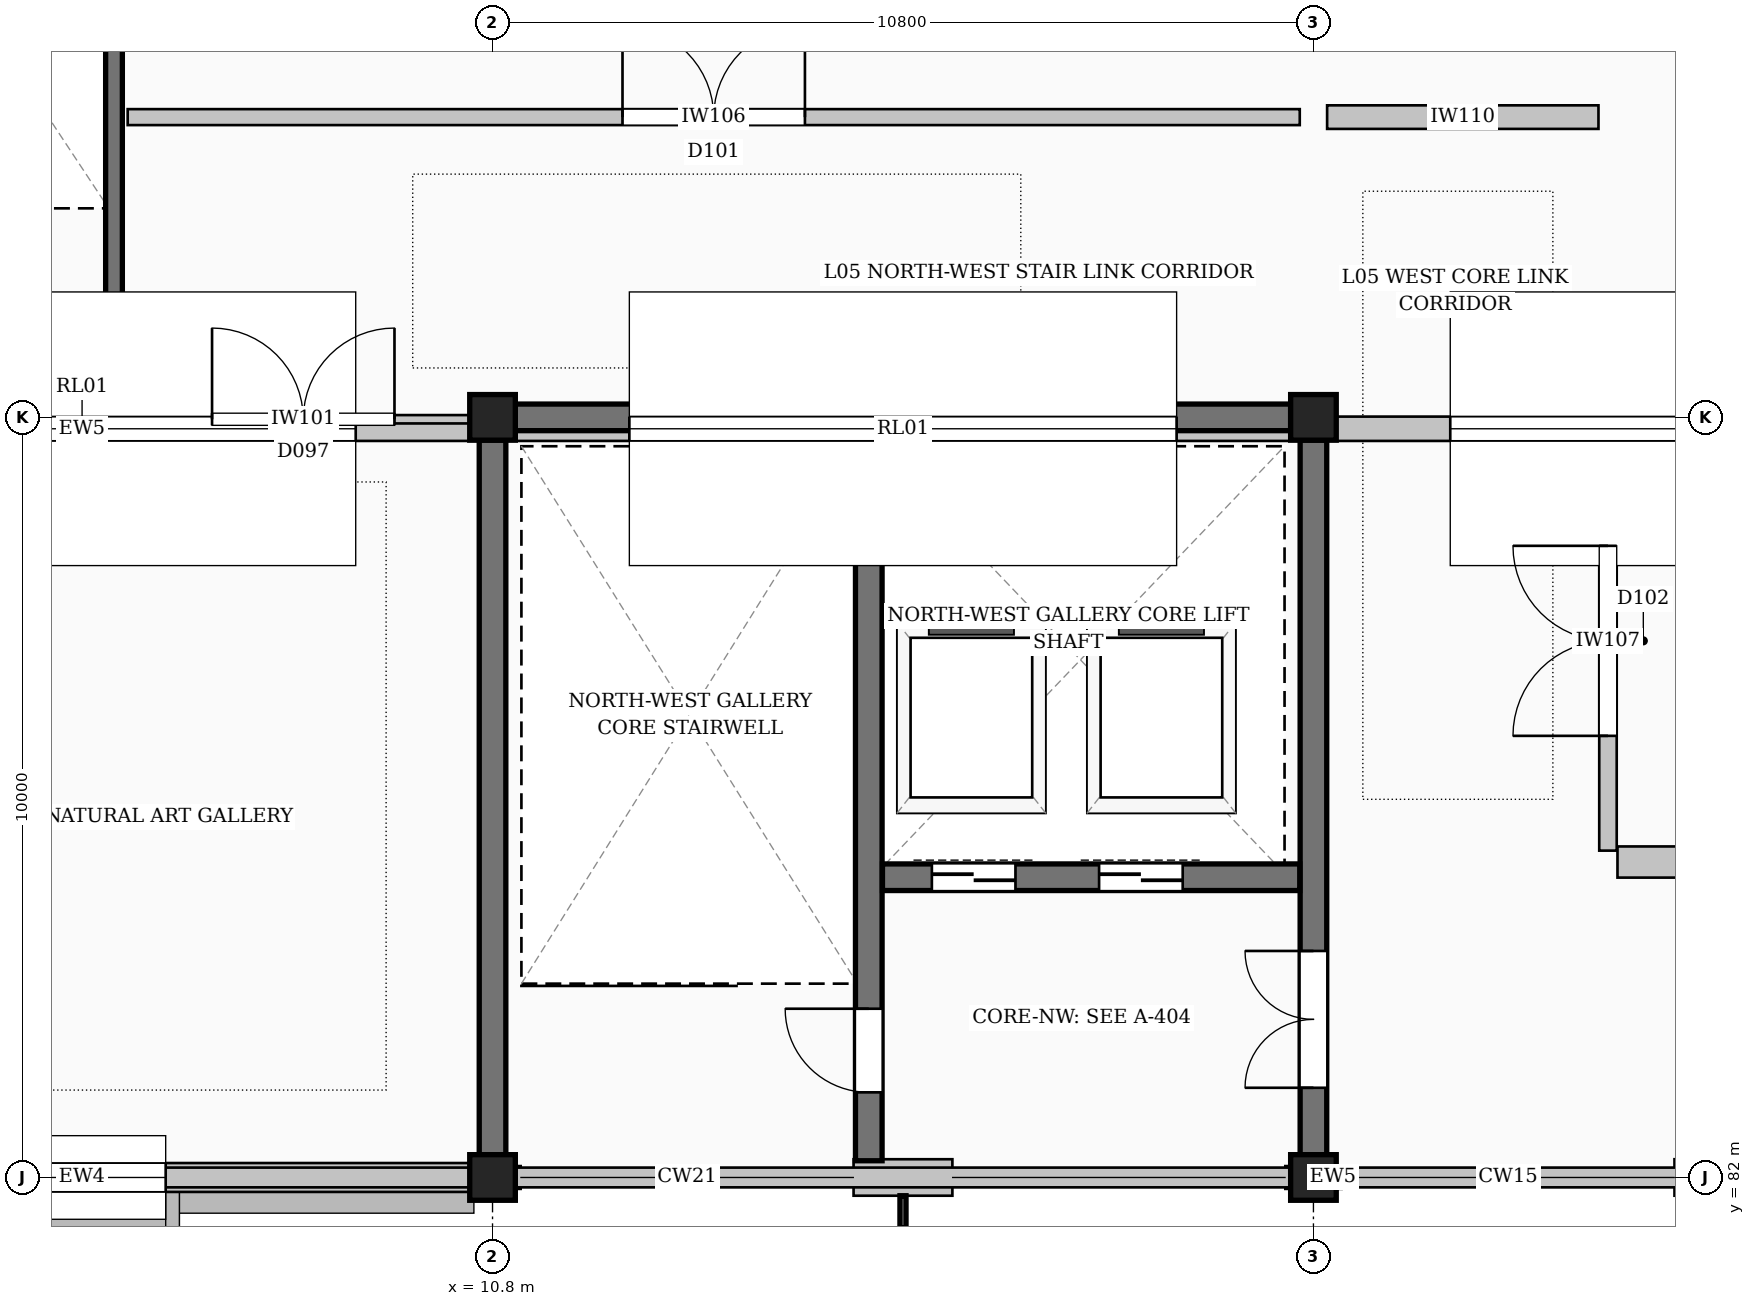
"""IFC4 building model, lengths in metres.
Left out: names, types, materials, properties, quantities, classifications, styles, units other than length and angle.
Written with IfcOpenShell. Run it as: python <this file> out.ifc"""

import sys

from ifc_helpers import new_model, si_unit, direction, frame, frame_2d, origin, origin_2d, place, context, subcontext, project, spatial, rectangle, extrude, element, fill, save


model = new_model("IFC4")
c1 = context("Model", 3, precision=1e-05, world=origin(), true_north=direction((0.0, 1.0)))
c2 = subcontext(c1, "Body", "Model", "MODEL_VIEW")
j1 = project(units=[si_unit("LENGTHUNIT", "METRE"), si_unit("PLANEANGLEUNIT", "RADIAN")], contexts=[c1])
p1 = place(None, origin())
s1 = spatial("IfcSite", under=j1, at=p1, CompositionType="ELEMENT")
p2 = place(p1, origin())
s2 = spatial("IfcBuilding", under=s1, at=p2, CompositionType="ELEMENT")
p3 = place(p2, frame((0.0, 0.0, 28.8)))
s3 = spatial("IfcBuildingStorey", under=s2, at=p3, CompositionType="ELEMENT", Elevation=28.8)
for number, where, z_axis, x_axis in (
    (1, (10.8, 82.0, 0.0), (0.0, 0.0, 1.0), (1.0, 0.0, 0.0)),
    (2, (10.8, 92.0, 0.0), (0.0, 0.0, 1.0), (1.0, 0.0, 0.0)),
    (3, (21.6, 82.0, 0.0), (0.0, 0.0, 1.0), (1.0, 0.0, 0.0)),
    (4, (21.6, 92.0, 0.0), (0.0, 0.0, 1.0), (1.0, 0.0, 0.0)),
):
    element("IfcColumn", number, at=place(p3, frame(where, z_axis=z_axis, x_axis=x_axis)), inside=s3, PredefinedType="COLUMN", context=c2, shape_type="SweptSolid", body=[
        extrude(rectangle(XDim=0.6, YDim=0.6, at=origin_2d()), origin(), (0.0, 0.0, 1.0), 5.4),
    ])
p4 = place(p3, frame((0.145, 82.0, 0.0), z_axis=(0.0, 0.0, 1.0), x_axis=(1.0, 0.0, 0.0)))
e5 = element("IfcWall", 5, at=p4, inside=s3, PredefinedType="STANDARD", context=c2, shape_type="SweptSolid", body=[
    extrude(rectangle(XDim=10.51, YDim=0.38, at=frame_2d((5.255, 0.0))), origin(), (0.0, 0.0, 1.0), 5.044),
])
p5 = place(p4, frame((4.155, 0.0, 1.0)))
e6 = element("IfcOpeningElement", 6, at=p5, cuts=e5, PredefinedType="OPENING", context=c2, shape_type="SweptSolid", body=[
    extrude(rectangle(XDim=2.2, YDim=3.0, at=frame_2d((1.1, 1.5))), frame((0.0, 0.2, 0.0), z_axis=(0.0, -1.0, 0.0), x_axis=(1.0, 0.0, 0.0)), (0.0, 0.0, 1.0), 0.4),
])
p6 = place(p3, frame((15.55, 82.0, 0.0), z_axis=(0.0, 0.0, 1.0), x_axis=(1.0, 0.0, 0.0)))
e7 = element("IfcWall", 7, at=p6, inside=s3, PredefinedType="STANDARD", context=c2, shape_type="SweptSolid", body=[
    extrude(rectangle(XDim=1.3, YDim=0.48, at=frame_2d((0.65, 0.0))), origin(), (0.0, 0.0, 1.0), 5.044),
])
p7 = place(p3, frame((10.945, 82.0, 0.0), z_axis=(0.0, 0.0, 1.0), x_axis=(1.0, 0.0, 0.0)))
e8 = element("IfcWall", 8, at=p7, inside=s3, PredefinedType="STANDARD", context=c2, shape_type="SweptSolid", body=[
    extrude(rectangle(XDim=0.225, YDim=0.3, at=frame_2d((0.112, 0.0))), origin(), (0.0, 0.0, 1.0), 5.16),
])
p8 = place(p3, frame((21.23, 82.0, 0.0), z_axis=(0.0, 0.0, 1.0), x_axis=(1.0, 0.0, 0.0)))
e9 = element("IfcWall", 9, at=p8, inside=s3, PredefinedType="STANDARD", context=c2, shape_type="SweptSolid", body=[
    extrude(rectangle(XDim=0.225, YDim=0.3, at=frame_2d((0.113, 0.0))), origin(), (0.0, 0.0, 1.0), 5.16),
])
p9 = place(p3, frame((21.745, 82.0, 0.0), z_axis=(0.0, 0.0, 1.0), x_axis=(1.0, 0.0, 0.0)))
e10 = element("IfcWall", 10, at=p9, inside=s3, PredefinedType="STANDARD", context=c2, shape_type="SweptSolid", body=[
    extrude(rectangle(XDim=0.225, YDim=0.3, at=frame_2d((0.112, 0.0))), origin(), (0.0, 0.0, 1.0), 5.16),
])
p10 = place(p3, frame((0.16, 91.85, 5.4), z_axis=(0.0, 0.0, 1.0), x_axis=(1.0, 0.0, 0.0)))
e11 = element("IfcWall", 11, at=p10, inside=s3, PredefinedType="STANDARD", context=c2, shape_type="SweptSolid", body=[
    extrude(rectangle(XDim=10.48, YDim=0.32, at=frame_2d((5.24, 0.0))), origin(), (0.0, 0.0, 1.0), 2.45),
])
p11 = place(p10, frame((1.64, 0.0, 0.45)))
e12 = element("IfcOpeningElement", 12, at=p11, cuts=e11, PredefinedType="OPENING", context=c2, shape_type="SweptSolid", body=[
    extrude(rectangle(XDim=7.2, YDim=1.5, at=frame_2d((3.6, 0.75))), frame((0.0, 0.17, 0.0), z_axis=(0.0, -1.0, 0.0), x_axis=(1.0, 0.0, 0.0)), (0.0, 0.0, 1.0), 0.34),
])
p12 = place(p3, frame((10.96, 91.85, 5.4), z_axis=(0.0, 0.0, 1.0), x_axis=(1.0, 0.0, 0.0)))
e13 = element("IfcWall", 13, at=p12, inside=s3, PredefinedType="STANDARD", context=c2, shape_type="SweptSolid", body=[
    extrude(rectangle(XDim=10.48, YDim=0.32, at=frame_2d((5.24, 0.0))), origin(), (0.0, 0.0, 1.0), 2.45),
])
p13 = place(p12, frame((1.64, 0.0, 0.45)))
e14 = element("IfcOpeningElement", 14, at=p13, cuts=e13, PredefinedType="OPENING", context=c2, shape_type="SweptSolid", body=[
    extrude(rectangle(XDim=7.2, YDim=1.5, at=frame_2d((3.6, 0.75))), frame((0.0, 0.17, 0.0), z_axis=(0.0, -1.0, 0.0), x_axis=(1.0, 0.0, 0.0)), (0.0, 0.0, 1.0), 0.34),
])
p14 = place(p3, frame((21.76, 91.85, 5.4), z_axis=(0.0, 0.0, 1.0), x_axis=(1.0, 0.0, 0.0)))
e15 = element("IfcWall", 15, at=p14, inside=s3, PredefinedType="STANDARD", context=c2, shape_type="SweptSolid", body=[
    extrude(rectangle(XDim=10.48, YDim=0.32, at=frame_2d((5.24, 0.0))), origin(), (0.0, 0.0, 1.0), 2.45),
])
p15 = place(p14, frame((1.64, 0.0, 0.45)))
e16 = element("IfcOpeningElement", 16, at=p15, cuts=e15, PredefinedType="OPENING", context=c2, shape_type="SweptSolid", body=[
    extrude(rectangle(XDim=7.2, YDim=1.5, at=frame_2d((3.6, 0.75))), frame((0.0, 0.17, 0.0), z_axis=(0.0, -1.0, 0.0), x_axis=(1.0, 0.0, 0.0)), (0.0, 0.0, 1.0), 0.34),
])
p16 = place(p3, frame((0.35, 82.0, 5.22), z_axis=(0.0, 0.0, 1.0), x_axis=(1.0, 0.0, 0.0)))
e17 = element("IfcWall", 17, at=p16, inside=s3, PredefinedType="PARAPET", context=c2, shape_type="SweptSolid", body=[
    extrude(rectangle(XDim=74.9, YDim=0.26, at=frame_2d((37.45, 0.0))), origin(), (0.0, 0.0, 1.0), 0.55),
])
p17 = place(p3, frame((11.1, 92.0, 0.0), z_axis=(0.0, 0.0, 1.0), x_axis=(1.0, 0.0, 0.0)))
e18 = element("IfcWall", 18, at=p17, inside=s3, PredefinedType="SHEAR", context=c2, shape_type="SweptSolid", body=[
    extrude(rectangle(XDim=10.2, YDim=0.35, at=frame_2d((5.1, 0.0))), origin(), (0.0, 0.0, 1.0), 5.16),
])
p18 = place(p3, frame((10.8, 82.3, 0.0), z_axis=(0.0, 0.0, 1.0), x_axis=(0.0, 1.0, 0.0)))
e19 = element("IfcWall", 19, at=p18, inside=s3, PredefinedType="SHEAR", context=c2, shape_type="SweptSolid", body=[
    extrude(rectangle(XDim=9.4, YDim=0.35, at=frame_2d((4.7, 0.0))), origin(), (0.0, 0.0, 1.0), 5.16),
])
p19 = place(p3, frame((21.6, 82.3, 0.0), z_axis=(0.0, 0.0, 1.0), x_axis=(0.0, 1.0, 0.0)))
e20 = element("IfcWall", 20, at=p19, inside=s3, PredefinedType="SHEAR", context=c2, shape_type="SweptSolid", body=[
    extrude(rectangle(XDim=9.4, YDim=0.35, at=frame_2d((4.7, 0.0))), origin(), (0.0, 0.0, 1.0), 5.16),
])
p20 = place(p19, frame((0.88, 0.0, 0.0)))
e21 = element("IfcOpeningElement", 21, at=p20, cuts=e20, PredefinedType="OPENING", context=c2, shape_type="SweptSolid", body=[
    extrude(rectangle(XDim=1.8, YDim=2.25, at=frame_2d((0.9, 1.125))), frame((0.0, 0.185, 0.0), z_axis=(0.0, -1.0, 0.0), x_axis=(1.0, 0.0, 0.0)), (0.0, 0.0, 1.0), 0.37),
])
p21 = place(p3, frame((15.75, 82.22, 0.0), z_axis=(0.0, 0.0, 1.0), x_axis=(0.0, 1.0, 0.0)))
e22 = element("IfcWall", 22, at=p21, inside=s3, PredefinedType="SHEAR", context=c2, shape_type="SweptSolid", body=[
    extrude(rectangle(XDim=9.605, YDim=0.35, at=frame_2d((4.802, 0.0))), origin(), (0.0, 0.0, 1.0), 5.16),
])
p22 = place(p21, frame((0.9, 0.0, 0.0)))
e23 = element("IfcOpeningElement", 23, at=p22, cuts=e22, PredefinedType="OPENING", context=c2, shape_type="SweptSolid", body=[
    extrude(rectangle(XDim=1.1, YDim=2.2, at=frame_2d((0.55, 1.1))), frame((0.0, 0.185, 0.0), z_axis=(0.0, -1.0, 0.0), x_axis=(1.0, 0.0, 0.0)), (0.0, 0.0, 1.0), 0.37),
])
p23 = place(p3, frame((15.93, 85.95, 0.0), z_axis=(0.0, 0.0, 1.0), x_axis=(1.0, 0.0, 0.0)))
e24 = element("IfcWall", 24, at=p23, inside=s3, PredefinedType="SHEAR", context=c2, shape_type="SweptSolid", body=[
    extrude(rectangle(XDim=5.49, YDim=0.35, at=frame_2d((2.745, 0.0))), origin(), (0.0, 0.0, 1.0), 5.16),
])
p24 = place(p23, frame((0.65, 0.0, 0.0)))
e25 = element("IfcOpeningElement", 25, at=p24, cuts=e24, PredefinedType="OPENING", context=c2, shape_type="SweptSolid", body=[
    extrude(rectangle(XDim=1.1, YDim=2.2, at=frame_2d((0.55, 1.1))), frame((0.0, 0.185, 0.0), z_axis=(0.0, -1.0, 0.0), x_axis=(1.0, 0.0, 0.0)), (0.0, 0.0, 1.0), 0.37),
])
p25 = place(p23, frame((2.85, 0.0, 0.0)))
e26 = element("IfcOpeningElement", 26, at=p25, cuts=e24, PredefinedType="OPENING", context=c2, shape_type="SweptSolid", body=[
    extrude(rectangle(XDim=1.1, YDim=2.2, at=frame_2d((0.55, 1.1))), frame((0.0, 0.185, 0.0), z_axis=(0.0, -1.0, 0.0), x_axis=(1.0, 0.0, 0.0)), (0.0, 0.0, 1.0), 0.37),
])
p26 = place(p3, frame((5.82, 92.53, 0.0), z_axis=(0.0, 0.0, 1.0), x_axis=(0.0, 1.0, 0.0)))
e27 = element("IfcWall", 27, at=p26, inside=s3, PredefinedType="SHEAR", context=c2, shape_type="SweptSolid", body=[
    extrude(rectangle(XDim=9.14, YDim=0.22, at=frame_2d((4.57, 0.0))), origin(), (0.0, 0.0, 1.0), 5.16),
])
p27 = place(p3, frame((1.3, 92.53, 0.0), z_axis=(0.0, 0.0, 1.0), x_axis=(1.0, 0.0, 0.0)))
e28 = element("IfcWall", 28, at=p27, inside=s3, PredefinedType="SHEAR", context=c2, shape_type="SweptSolid", body=[
    extrude(rectangle(XDim=4.4, YDim=0.22, at=frame_2d((2.2, 0.0))), origin(), (0.0, 0.0, 1.0), 5.16),
])
p28 = place(p27, frame((1.65, 0.0, 0.0)))
e29 = element("IfcOpeningElement", 29, at=p28, cuts=e28, PredefinedType="OPENING", context=c2, shape_type="SweptSolid", body=[
    extrude(rectangle(XDim=1.1, YDim=2.2, at=frame_2d((0.55, 1.1))), frame((0.0, 0.12, 0.0), z_axis=(0.0, -1.0, 0.0), x_axis=(1.0, 0.0, 0.0)), (0.0, 0.0, 1.0), 0.24),
])
p29 = place(p3, frame((25.6, 86.15, 0.0), z_axis=(0.0, 0.0, 1.0), x_axis=(1.0, 0.0, 0.0)))
e30 = element("IfcWall", 30, at=p29, inside=s3, PredefinedType="PARTITIONING", context=c2, shape_type="SweptSolid", body=[
    extrude(rectangle(XDim=28.22, YDim=0.41, at=frame_2d((14.11, 0.0))), origin(), (0.0, 0.0, 1.0), 5.12),
])
p30 = place(p29, frame((13.235, 0.0, 0.0)))
e31 = element("IfcOpeningElement", 31, at=p30, cuts=e30, PredefinedType="OPENING", context=c2, shape_type="SweptSolid", body=[
    extrude(rectangle(XDim=1.75, YDim=2.45, at=frame_2d((0.875, 1.225))), frame((0.0, 0.215, 0.0), z_axis=(0.0, -1.0, 0.0), x_axis=(1.0, 0.0, 0.0)), (0.0, 0.0, 1.0), 0.43),
])
p31 = place(p3, frame((6.0, 91.975, 0.0), z_axis=(0.0, 0.0, 1.0), x_axis=(1.0, 0.0, 0.0)))
e32 = element("IfcWall", 32, at=p31, inside=s3, PredefinedType="PARTITIONING", context=c2, shape_type="SweptSolid", body=[
    extrude(rectangle(XDim=4.62, YDim=0.11, at=frame_2d((2.31, 0.0))), origin(), (0.0, 0.0, 1.0), 5.044),
])
p32 = place(p31, frame((1.11, 0.0, 0.0)))
e33 = element("IfcOpeningElement", 33, at=p32, cuts=e32, PredefinedType="OPENING", context=c2, shape_type="SweptSolid", body=[
    extrude(rectangle(XDim=2.4, YDim=2.8, at=frame_2d((1.2, 1.4))), frame((0.0, 0.065, 0.0), z_axis=(0.0, -1.0, 0.0), x_axis=(1.0, 0.0, 0.0)), (0.0, 0.0, 1.0), 0.13),
])
p33 = place(p3, frame((6.0, 95.95, 0.0), z_axis=(0.0, 0.0, 1.0), x_axis=(1.0, 0.0, 0.0)))
e34 = element("IfcWall", 34, at=p33, inside=s3, PredefinedType="PARTITIONING", context=c2, shape_type="SweptSolid", body=[
    extrude(rectangle(XDim=15.42, YDim=0.21, at=frame_2d((7.71, 0.0))), origin(), (0.0, 0.0, 1.0), 5.12),
])
p34 = place(p33, frame((6.51, 0.0, 0.0)))
e35 = element("IfcOpeningElement", 35, at=p34, cuts=e34, PredefinedType="OPENING", context=c2, shape_type="SweptSolid", body=[
    extrude(rectangle(XDim=2.4, YDim=2.8, at=frame_2d((1.2, 1.4))), frame((0.0, 0.115, 0.0), z_axis=(0.0, -1.0, 0.0), x_axis=(1.0, 0.0, 0.0)), (0.0, 0.0, 1.0), 0.23),
])
p35 = place(p3, frame((25.475, 86.3, 0.0), z_axis=(0.0, 0.0, 1.0), x_axis=(0.0, 1.0, 0.0)))
e36 = element("IfcWall", 36, at=p35, inside=s3, PredefinedType="PARTITIONING", context=c2, shape_type="SweptSolid", body=[
    extrude(rectangle(XDim=5.52, YDim=0.23, at=frame_2d((2.76, 0.0))), origin(), (0.0, 0.0, 1.0), 5.12),
])
p36 = place(p35, frame((1.51, 0.0, 0.0)))
e37 = element("IfcOpeningElement", 37, at=p36, cuts=e36, PredefinedType="OPENING", context=c2, shape_type="SweptSolid", body=[
    extrude(rectangle(XDim=2.5, YDim=2.75, at=frame_2d((1.25, 1.375))), frame((0.0, 0.125, 0.0), z_axis=(0.0, -1.0, 0.0), x_axis=(1.0, 0.0, 0.0)), (0.0, 0.0, 1.0), 0.25),
])
p37 = place(p3, frame((21.78, 95.95, 0.0), z_axis=(0.0, 0.0, 1.0), x_axis=(1.0, 0.0, 0.0)))
e38 = element("IfcWall", 38, at=p37, inside=s3, PredefinedType="PARTITIONING", context=c2, shape_type="SweptSolid", body=[
    extrude(rectangle(XDim=3.57, YDim=0.31, at=frame_2d((1.785, 0.0))), origin(), (0.0, 0.0, 1.0), 5.12),
])
p38 = place(p5, origin())
e39 = element("IfcWindow", 39, at=p38, inside=s3, PartitioningType="SINGLE_PANEL", PredefinedType="WINDOW", context=c2, shape_type="SweptSolid", body=[
    extrude(rectangle(XDim=2.2, YDim=3.0, at=frame_2d((1.1, 1.5))), frame((0.0, 0.03, 0.0), z_axis=(0.0, -1.0, 0.0), x_axis=(1.0, 0.0, 0.0)), (0.0, 0.0, 1.0), 0.06),
])
fill(e6, e39)
p39 = place(p11, origin())
e40 = element("IfcWindow", 40, at=p39, inside=s3, PartitioningType="SINGLE_PANEL", PredefinedType="SKYLIGHT", context=c2, shape_type="SweptSolid", body=[
    extrude(rectangle(XDim=7.2, YDim=1.5, at=frame_2d((3.6, 0.75))), frame((0.0, 0.03, 0.0), z_axis=(0.0, -1.0, 0.0), x_axis=(1.0, 0.0, 0.0)), (0.0, 0.0, 1.0), 0.06),
])
fill(e12, e40)
p40 = place(p13, origin())
e41 = element("IfcWindow", 41, at=p40, inside=s3, PartitioningType="SINGLE_PANEL", PredefinedType="SKYLIGHT", context=c2, shape_type="SweptSolid", body=[
    extrude(rectangle(XDim=7.2, YDim=1.5, at=frame_2d((3.6, 0.75))), frame((0.0, 0.03, 0.0), z_axis=(0.0, -1.0, 0.0), x_axis=(1.0, 0.0, 0.0)), (0.0, 0.0, 1.0), 0.06),
])
fill(e14, e41)
p41 = place(p15, origin())
e42 = element("IfcWindow", 42, at=p41, inside=s3, PartitioningType="SINGLE_PANEL", PredefinedType="SKYLIGHT", context=c2, shape_type="SweptSolid", body=[
    extrude(rectangle(XDim=7.2, YDim=1.5, at=frame_2d((3.6, 0.75))), frame((0.0, 0.03, 0.0), z_axis=(0.0, -1.0, 0.0), x_axis=(1.0, 0.0, 0.0)), (0.0, 0.0, 1.0), 0.06),
])
fill(e16, e42)
p42 = place(p22, origin())
e43 = element("IfcDoor", 43, at=p42, inside=s3, OperationType="SINGLE_SWING_RIGHT", PredefinedType="DOOR", context=c2, shape_type="SweptSolid", body=[
    extrude(rectangle(XDim=1.1, YDim=2.2, at=frame_2d((0.55, 1.1))), frame((0.0, 0.025, 0.0), z_axis=(0.0, -1.0, 0.0), x_axis=(1.0, 0.0, 0.0)), (0.0, 0.0, 1.0), 0.05),
])
fill(e23, e43)
p43 = place(p20, origin())
e44 = element("IfcDoor", 44, at=p43, inside=s3, OperationType="DOUBLE_DOOR_SINGLE_SWING", PredefinedType="DOOR", context=c2, shape_type="SweptSolid", body=[
    extrude(rectangle(XDim=1.8, YDim=2.25, at=frame_2d((0.9, 1.125))), frame((0.0, 0.025, 0.0), z_axis=(0.0, -1.0, 0.0), x_axis=(1.0, 0.0, 0.0)), (0.0, 0.0, 1.0), 0.05),
])
fill(e21, e44)
p44 = place(p24, origin())
e45 = element("IfcDoor", 45, at=p44, inside=s3, OperationType="DOUBLE_DOOR_SLIDING", PredefinedType="DOOR", context=c2, shape_type="SweptSolid", body=[
    extrude(rectangle(XDim=1.1, YDim=2.2, at=frame_2d((0.55, 1.1))), frame((0.0, 0.025, 0.0), z_axis=(0.0, -1.0, 0.0), x_axis=(1.0, 0.0, 0.0)), (0.0, 0.0, 1.0), 0.05),
])
fill(e25, e45)
p45 = place(p25, origin())
e46 = element("IfcDoor", 46, at=p45, inside=s3, OperationType="DOUBLE_DOOR_SLIDING", PredefinedType="DOOR", context=c2, shape_type="SweptSolid", body=[
    extrude(rectangle(XDim=1.1, YDim=2.2, at=frame_2d((0.55, 1.1))), frame((0.0, 0.025, 0.0), z_axis=(0.0, -1.0, 0.0), x_axis=(1.0, 0.0, 0.0)), (0.0, 0.0, 1.0), 0.05),
])
fill(e26, e46)
p46 = place(p32, origin())
e47 = element("IfcDoor", 47, at=p46, inside=s3, OperationType="DOUBLE_DOOR_SINGLE_SWING", PredefinedType="DOOR", context=c2, shape_type="SweptSolid", body=[
    extrude(rectangle(XDim=2.4, YDim=2.8, at=frame_2d((1.2, 1.4))), frame((0.0, 0.025, 0.0), z_axis=(0.0, -1.0, 0.0), x_axis=(1.0, 0.0, 0.0)), (0.0, 0.0, 1.0), 0.05),
])
fill(e33, e47)
p47 = place(p34, origin())
e48 = element("IfcDoor", 48, at=p47, inside=s3, OperationType="DOUBLE_DOOR_SINGLE_SWING", PredefinedType="DOOR", context=c2, shape_type="SweptSolid", body=[
    extrude(rectangle(XDim=2.4, YDim=2.8, at=frame_2d((1.2, 1.4))), frame((0.0, 0.025, 0.0), z_axis=(0.0, -1.0, 0.0), x_axis=(1.0, 0.0, 0.0)), (0.0, 0.0, 1.0), 0.05),
])
fill(e35, e48)
p48 = place(p36, origin())
e49 = element("IfcDoor", 49, at=p48, inside=s3, OperationType="DOUBLE_DOOR_SINGLE_SWING", PredefinedType="DOOR", context=c2, shape_type="SweptSolid", body=[
    extrude(rectangle(XDim=2.5, YDim=2.75, at=frame_2d((1.25, 1.375))), frame((0.0, 0.025, 0.0), z_axis=(0.0, -1.0, 0.0), x_axis=(1.0, 0.0, 0.0)), (0.0, 0.0, 1.0), 0.05),
])
fill(e37, e49)
save(model, sys.argv[1])
